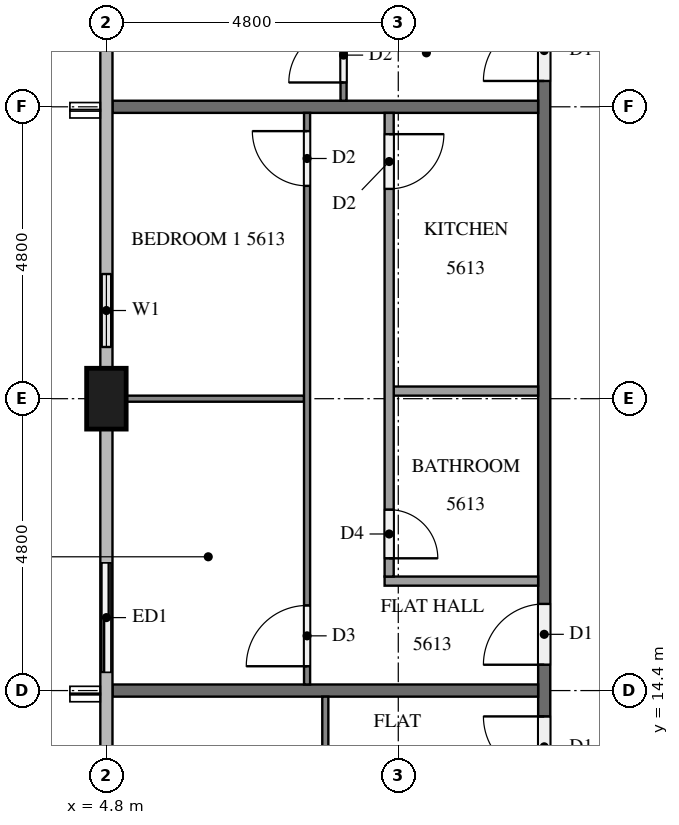
"""IFC4 building model, lengths in metres.
Left out: names, types, materials, properties, quantities, classifications, styles, units other than length and angle.
Written with IfcOpenShell. Run it as: python <this file> out.ifc"""

import sys

from ifc_helpers import new_model, si_unit, direction, frame, frame_2d, origin, origin_2d, place, context, subcontext, project, spatial, rectangle, extrude, element, fill, save


model = new_model("IFC4")
c1 = context("Model", 3, precision=1e-05, world=origin(), true_north=direction((0.0, 1.0)))
c2 = subcontext(c1, "Body", "Model", "MODEL_VIEW")
j1 = project(units=[si_unit("LENGTHUNIT", "METRE"), si_unit("PLANEANGLEUNIT", "RADIAN")], contexts=[c1])
p1 = place(None, origin())
s1 = spatial("IfcSite", under=j1, at=p1, CompositionType="ELEMENT")
p2 = place(p1, origin())
s2 = spatial("IfcBuilding", under=s1, at=p2, CompositionType="ELEMENT")
p3 = place(p2, frame((0.0, 0.0, 215.8)))
s3 = spatial("IfcBuildingStorey", under=s2, at=p3, CompositionType="ELEMENT", Elevation=215.8)
p4 = place(p3, frame((4.8, 19.2, 0.0), z_axis=(0.0, 0.0, 1.0), x_axis=(0.0, 1.0, 0.0)))
e1 = element("IfcColumn", 1, at=p4, inside=s3, PredefinedType="COLUMN", context=c2, shape_type="SweptSolid", body=[
    extrude(rectangle(XDim=1.0, YDim=0.65, at=origin_2d()), origin(), (0.0, 0.0, 1.0), 3.2),
])
p5 = place(p3, frame((4.8, 21.6, 0.0), z_axis=(0.0, 0.0, 1.0), x_axis=(0.0, -1.0, 0.0)))
e2 = element("IfcWall", 2, at=p5, inside=s3, PredefinedType="SOLIDWALL", context=c2, shape_type="SweptSolid", body=[
    extrude(rectangle(XDim=1.9, YDim=0.15, at=frame_2d((0.95, 0.0))), origin(), (0.0, 0.0, 1.0), 3.2),
])
p6 = place(p5, frame((0.35, 0.0, 0.9)))
e3 = element("IfcOpeningElement", 3, at=p6, cuts=e2, PredefinedType="OPENING", context=c2, shape_type="SweptSolid", body=[
    extrude(rectangle(XDim=1.2, YDim=1.4, at=frame_2d((0.6, 0.7))), frame((0.0, 0.085, 0.0), z_axis=(0.0, -1.0, 0.0), x_axis=(1.0, 0.0, 0.0)), (0.0, 0.0, 1.0), 0.17),
])
p7 = place(p3, frame((4.8, 16.8, 0.0), z_axis=(0.0, 0.0, 1.0), x_axis=(0.0, -1.0, 0.0)))
e4 = element("IfcWall", 4, at=p7, inside=s3, PredefinedType="SOLIDWALL", context=c2, shape_type="SweptSolid", body=[
    extrude(rectangle(XDim=2.4, YDim=0.15, at=frame_2d((1.2, 0.0))), origin(), (0.0, 0.0, 1.0), 3.2),
])
p8 = place(p7, frame((0.3, 0.0, 0.0)))
e5 = element("IfcOpeningElement", 5, at=p8, cuts=e4, PredefinedType="OPENING", context=c2, shape_type="SweptSolid", body=[
    extrude(rectangle(XDim=1.8, YDim=2.4, at=frame_2d((0.9, 1.2))), frame((0.0, 0.085, 0.0), z_axis=(0.0, -1.0, 0.0), x_axis=(1.0, 0.0, 0.0)), (0.0, 0.0, 1.0), 0.17),
])
p9 = place(p3, frame((12.0, 12.1, 0.0), z_axis=(0.0, 0.0, 1.0), x_axis=(0.0, 1.0, 0.0)))
e6 = element("IfcWall", 6, at=p9, inside=s3, PredefinedType="PARTITIONING", context=c2, shape_type="SweptSolid", body=[
    extrude(rectangle(XDim=28.6, YDim=0.2, at=frame_2d((14.3, 0.0))), origin(), (0.0, 0.0, 1.0), 3.2),
])
p10 = place(p9, frame((27.275, 0.0, 0.0)))
e7 = element("IfcOpeningElement", 7, at=p10, cuts=e6, PredefinedType="OPENING", context=c2, shape_type="SweptSolid", body=[
    extrude(rectangle(XDim=1.0, YDim=2.1, at=frame_2d((0.5, 1.05))), frame((0.0, 0.11, 0.0), z_axis=(0.0, -1.0, 0.0), x_axis=(1.0, 0.0, 0.0)), (0.0, 0.0, 1.0), 0.22),
])
p11 = place(p9, frame((12.325, 0.0, 0.0)))
e8 = element("IfcOpeningElement", 8, at=p11, cuts=e6, PredefinedType="OPENING", context=c2, shape_type="SweptSolid", body=[
    extrude(rectangle(XDim=1.0, YDim=2.1, at=frame_2d((0.5, 1.05))), frame((0.0, 0.11, 0.0), z_axis=(0.0, -1.0, 0.0), x_axis=(1.0, 0.0, 0.0)), (0.0, 0.0, 1.0), 0.22),
])
p12 = place(p9, frame((2.725, 0.0, 0.0)))
e9 = element("IfcOpeningElement", 9, at=p12, cuts=e6, PredefinedType="OPENING", context=c2, shape_type="SweptSolid", body=[
    extrude(rectangle(XDim=1.0, YDim=2.1, at=frame_2d((0.5, 1.05))), frame((0.0, 0.11, 0.0), z_axis=(0.0, -1.0, 0.0), x_axis=(1.0, 0.0, 0.0)), (0.0, 0.0, 1.0), 0.22),
])
p13 = place(p9, frame((0.875, 0.0, 0.0)))
e10 = element("IfcOpeningElement", 10, at=p13, cuts=e6, PredefinedType="OPENING", context=c2, shape_type="SweptSolid", body=[
    extrude(rectangle(XDim=1.0, YDim=2.1, at=frame_2d((0.5, 1.05))), frame((0.0, 0.11, 0.0), z_axis=(0.0, -1.0, 0.0), x_axis=(1.0, 0.0, 0.0)), (0.0, 0.0, 1.0), 0.22),
])
for number, where, z_axis, x_axis in (
    (11, (4.9, 24.0, 0.0), (0.0, 0.0, 1.0), (1.0, 0.0, 0.0)),
    (12, (4.9, 14.4, 0.0), (0.0, 0.0, 1.0), (1.0, 0.0, 0.0)),
):
    element("IfcWall", number, at=place(p3, frame(where, z_axis=z_axis, x_axis=x_axis)), inside=s3, PredefinedType="PARTITIONING", context=c2, shape_type="SweptSolid", body=[
        extrude(rectangle(XDim=7.0, YDim=0.2, at=frame_2d((3.5, 0.0))), origin(), (0.0, 0.0, 1.0), 3.2),
    ])
p14 = place(p3, frame((8.7, 24.1, 0.0), z_axis=(0.0, 0.0, 1.0), x_axis=(0.0, 1.0, 0.0)))
e13 = element("IfcWall", 13, at=p14, inside=s3, PredefinedType="PARTITIONING", context=c2, shape_type="SweptSolid", body=[
    extrude(rectangle(XDim=9.4, YDim=0.1, at=frame_2d((4.7, 0.0))), origin(), (0.0, 0.0, 1.0), 3.2),
])
p15 = place(p14, frame((0.3, 0.0, 0.0)))
e14 = element("IfcOpeningElement", 14, at=p15, cuts=e13, PredefinedType="OPENING", context=c2, shape_type="SweptSolid", body=[
    extrude(rectangle(XDim=0.9, YDim=2.1, at=frame_2d((0.45, 1.05))), frame((0.0, 0.06, 0.0), z_axis=(0.0, -1.0, 0.0), x_axis=(1.0, 0.0, 0.0)), (0.0, 0.0, 1.0), 0.12),
])
p16 = place(p14, frame((8.1, 0.0, 0.0)))
e15 = element("IfcOpeningElement", 15, at=p16, cuts=e13, PredefinedType="OPENING", context=c2, shape_type="SweptSolid", body=[
    extrude(rectangle(XDim=1.0, YDim=2.1, at=frame_2d((0.5, 1.05))), frame((0.0, 0.06, 0.0), z_axis=(0.0, -1.0, 0.0), x_axis=(1.0, 0.0, 0.0)), (0.0, 0.0, 1.0), 0.12),
])
p17 = place(p3, frame((8.05, 19.2, 0.0), z_axis=(0.0, 0.0, 1.0), x_axis=(-1.0, 0.0, 0.0)))
e16 = element("IfcWall", 16, at=p17, inside=s3, PredefinedType="PARTITIONING", context=c2, shape_type="SweptSolid", body=[
    extrude(rectangle(XDim=2.925, YDim=0.1, at=frame_2d((1.462, 0.0))), origin(), (0.0, 0.0, 1.0), 3.2),
])
p18 = place(p3, frame((8.1, 14.5, 0.0), z_axis=(0.0, 0.0, 1.0), x_axis=(0.0, 1.0, 0.0)))
e17 = element("IfcWall", 17, at=p18, inside=s3, PredefinedType="PARTITIONING", context=c2, shape_type="SweptSolid", body=[
    extrude(rectangle(XDim=9.4, YDim=0.1, at=frame_2d((4.7, 0.0))), origin(), (0.0, 0.0, 1.0), 3.2),
])
p19 = place(p18, frame((0.3, 0.0, 0.0)))
e18 = element("IfcOpeningElement", 18, at=p19, cuts=e17, PredefinedType="OPENING", context=c2, shape_type="SweptSolid", body=[
    extrude(rectangle(XDim=1.0, YDim=2.1, at=frame_2d((0.5, 1.05))), frame((0.0, 0.06, 0.0), z_axis=(0.0, -1.0, 0.0), x_axis=(1.0, 0.0, 0.0)), (0.0, 0.0, 1.0), 0.12),
])
p20 = place(p18, frame((8.2, 0.0, 0.0)))
e19 = element("IfcOpeningElement", 19, at=p20, cuts=e17, PredefinedType="OPENING", context=c2, shape_type="SweptSolid", body=[
    extrude(rectangle(XDim=0.9, YDim=2.1, at=frame_2d((0.45, 1.05))), frame((0.0, 0.06, 0.0), z_axis=(0.0, -1.0, 0.0), x_axis=(1.0, 0.0, 0.0)), (0.0, 0.0, 1.0), 0.12),
])
p21 = place(p3, frame((11.9, 19.325, 0.0), z_axis=(0.0, 0.0, 1.0), x_axis=(-1.0, 0.0, 0.0)))
e20 = element("IfcWall", 20, at=p21, inside=s3, PredefinedType="PARTITIONING", context=c2, shape_type="SweptSolid", body=[
    extrude(rectangle(XDim=2.375, YDim=0.15, at=frame_2d((1.188, 0.0))), origin(), (0.0, 0.0, 1.0), 3.2),
])
p22 = place(p3, frame((11.9, 16.2, 0.0), z_axis=(0.0, 0.0, 1.0), x_axis=(-1.0, 0.0, 0.0)))
e21 = element("IfcWall", 21, at=p22, inside=s3, PredefinedType="PARTITIONING", context=c2, shape_type="SweptSolid", body=[
    extrude(rectangle(XDim=2.525, YDim=0.15, at=frame_2d((1.262, 0.0))), origin(), (0.0, 0.0, 1.0), 3.2),
])
p23 = place(p3, frame((9.45, 23.9, 0.0), z_axis=(0.0, 0.0, 1.0), x_axis=(0.0, -1.0, 0.0)))
e22 = element("IfcWall", 22, at=p23, inside=s3, PredefinedType="PARTITIONING", context=c2, shape_type="SweptSolid", body=[
    extrude(rectangle(XDim=7.625, YDim=0.15, at=frame_2d((3.812, 0.0))), origin(), (0.0, 0.0, 1.0), 3.2),
])
p24 = place(p23, frame((6.525, 0.0, 0.0)))
e23 = element("IfcOpeningElement", 23, at=p24, cuts=e22, PredefinedType="OPENING", context=c2, shape_type="SweptSolid", body=[
    extrude(rectangle(XDim=0.8, YDim=2.1, at=frame_2d((0.4, 1.05))), frame((0.0, 0.085, 0.0), z_axis=(0.0, -1.0, 0.0), x_axis=(1.0, 0.0, 0.0)), (0.0, 0.0, 1.0), 0.17),
])
p25 = place(p23, frame((0.35, 0.0, 0.0)))
e24 = element("IfcOpeningElement", 24, at=p25, cuts=e22, PredefinedType="OPENING", context=c2, shape_type="SweptSolid", body=[
    extrude(rectangle(XDim=0.9, YDim=2.1, at=frame_2d((0.45, 1.05))), frame((0.0, 0.085, 0.0), z_axis=(0.0, -1.0, 0.0), x_axis=(1.0, 0.0, 0.0)), (0.0, 0.0, 1.0), 0.17),
])
p26 = place(p3, frame((8.4, 5.221, 0.0), z_axis=(0.0, 0.0, 1.0), x_axis=(0.0, 1.0, 0.0)))
e25 = element("IfcWall", 25, at=p26, inside=s3, PredefinedType="PARTITIONING", context=c2, shape_type="SweptSolid", body=[
    extrude(rectangle(XDim=9.079, YDim=0.1, at=frame_2d((4.539, 0.0))), origin(), (0.0, 0.0, 1.0), 3.2),
])
p27 = place(p26, frame((4.729, 0.0, 0.0)))
e26 = element("IfcOpeningElement", 26, at=p27, cuts=e25, PredefinedType="OPENING", context=c2, shape_type="SweptSolid", body=[
    extrude(rectangle(XDim=0.9, YDim=2.1, at=frame_2d((0.45, 1.05))), frame((0.0, 0.06, 0.0), z_axis=(0.0, -1.0, 0.0), x_axis=(1.0, 0.0, 0.0)), (0.0, 0.0, 1.0), 0.12),
])
p28 = place(p26, frame((3.029, 0.0, 0.0)))
e27 = element("IfcOpeningElement", 27, at=p28, cuts=e25, PredefinedType="OPENING", context=c2, shape_type="SweptSolid", body=[
    extrude(rectangle(XDim=1.0, YDim=2.1, at=frame_2d((0.5, 1.05))), frame((0.0, 0.06, 0.0), z_axis=(0.0, -1.0, 0.0), x_axis=(1.0, 0.0, 0.0)), (0.0, 0.0, 1.0), 0.12),
])
p29 = place(p6, origin())
e28 = element("IfcWindow", 28, at=p29, inside=s3, PartitioningType="SINGLE_PANEL", PredefinedType="WINDOW", context=c2, shape_type="SweptSolid", body=[
    extrude(rectangle(XDim=1.2, YDim=1.4, at=frame_2d((0.6, 0.7))), frame((0.0, 0.03, 0.0), z_axis=(0.0, -1.0, 0.0), x_axis=(1.0, 0.0, 0.0)), (0.0, 0.0, 1.0), 0.06),
])
fill(e3, e28)
p30 = place(p8, origin())
e29 = element("IfcDoor", 29, at=p30, inside=s3, OperationType="SLIDING_TO_RIGHT", PredefinedType="DOOR", context=c2, shape_type="SweptSolid", body=[
    extrude(rectangle(XDim=1.8, YDim=2.4, at=frame_2d((0.9, 1.2))), frame((0.0, 0.025, 0.0), z_axis=(0.0, -1.0, 0.0), x_axis=(1.0, 0.0, 0.0)), (0.0, 0.0, 1.0), 0.05),
])
fill(e5, e29)
p31 = place(p11, origin())
e30 = element("IfcDoor", 30, at=p31, inside=s3, OperationType="SINGLE_SWING_LEFT", PredefinedType="DOOR", context=c2, shape_type="SweptSolid", body=[
    extrude(rectangle(XDim=1.0, YDim=2.1, at=frame_2d((0.5, 1.05))), frame((0.0, 0.025, 0.0), z_axis=(0.0, -1.0, 0.0), x_axis=(1.0, 0.0, 0.0)), (0.0, 0.0, 1.0), 0.05),
])
fill(e8, e30)
p32 = place(p12, origin())
e31 = element("IfcDoor", 31, at=p32, inside=s3, OperationType="SINGLE_SWING_LEFT", PredefinedType="DOOR", context=c2, shape_type="SweptSolid", body=[
    extrude(rectangle(XDim=1.0, YDim=2.1, at=frame_2d((0.5, 1.05))), frame((0.0, 0.025, 0.0), z_axis=(0.0, -1.0, 0.0), x_axis=(1.0, 0.0, 0.0)), (0.0, 0.0, 1.0), 0.05),
])
fill(e9, e31)
p33 = place(p13, origin())
e32 = element("IfcDoor", 32, at=p33, inside=s3, OperationType="SINGLE_SWING_RIGHT", PredefinedType="DOOR", context=c2, shape_type="SweptSolid", body=[
    extrude(rectangle(XDim=1.0, YDim=2.1, at=frame_2d((0.5, 1.05))), frame((0.0, 0.025, 0.0), z_axis=(0.0, -1.0, 0.0), x_axis=(1.0, 0.0, 0.0)), (0.0, 0.0, 1.0), 0.05),
])
fill(e10, e32)
p34 = place(p15, origin())
e33 = element("IfcDoor", 33, at=p34, inside=s3, OperationType="SINGLE_SWING_LEFT", PredefinedType="DOOR", context=c2, shape_type="SweptSolid", body=[
    extrude(rectangle(XDim=0.9, YDim=2.1, at=frame_2d((0.45, 1.05))), frame((0.0, 0.025, 0.0), z_axis=(0.0, -1.0, 0.0), x_axis=(1.0, 0.0, 0.0)), (0.0, 0.0, 1.0), 0.05),
])
fill(e14, e33)
p35 = place(p19, origin())
e34 = element("IfcDoor", 34, at=p35, inside=s3, OperationType="SINGLE_SWING_LEFT", PredefinedType="DOOR", context=c2, shape_type="SweptSolid", body=[
    extrude(rectangle(XDim=1.0, YDim=2.1, at=frame_2d((0.5, 1.05))), frame((0.0, 0.025, 0.0), z_axis=(0.0, -1.0, 0.0), x_axis=(1.0, 0.0, 0.0)), (0.0, 0.0, 1.0), 0.05),
])
fill(e18, e34)
p36 = place(p20, origin())
e35 = element("IfcDoor", 35, at=p36, inside=s3, OperationType="SINGLE_SWING_RIGHT", PredefinedType="DOOR", context=c2, shape_type="SweptSolid", body=[
    extrude(rectangle(XDim=0.9, YDim=2.1, at=frame_2d((0.45, 1.05))), frame((0.0, 0.025, 0.0), z_axis=(0.0, -1.0, 0.0), x_axis=(1.0, 0.0, 0.0)), (0.0, 0.0, 1.0), 0.05),
])
fill(e19, e35)
p37 = place(p24, origin())
e36 = element("IfcDoor", 36, at=p37, inside=s3, OperationType="SINGLE_SWING_RIGHT", PredefinedType="DOOR", context=c2, shape_type="SweptSolid", body=[
    extrude(rectangle(XDim=0.8, YDim=2.1, at=frame_2d((0.4, 1.05))), frame((0.0, 0.025, 0.0), z_axis=(0.0, -1.0, 0.0), x_axis=(1.0, 0.0, 0.0)), (0.0, 0.0, 1.0), 0.05),
])
fill(e23, e36)
p38 = place(p25, origin())
e37 = element("IfcDoor", 37, at=p38, inside=s3, OperationType="SINGLE_SWING_LEFT", PredefinedType="DOOR", context=c2, shape_type="SweptSolid", body=[
    extrude(rectangle(XDim=0.9, YDim=2.1, at=frame_2d((0.45, 1.05))), frame((0.0, 0.025, 0.0), z_axis=(0.0, -1.0, 0.0), x_axis=(1.0, 0.0, 0.0)), (0.0, 0.0, 1.0), 0.05),
])
fill(e24, e37)
save(model, sys.argv[1])
